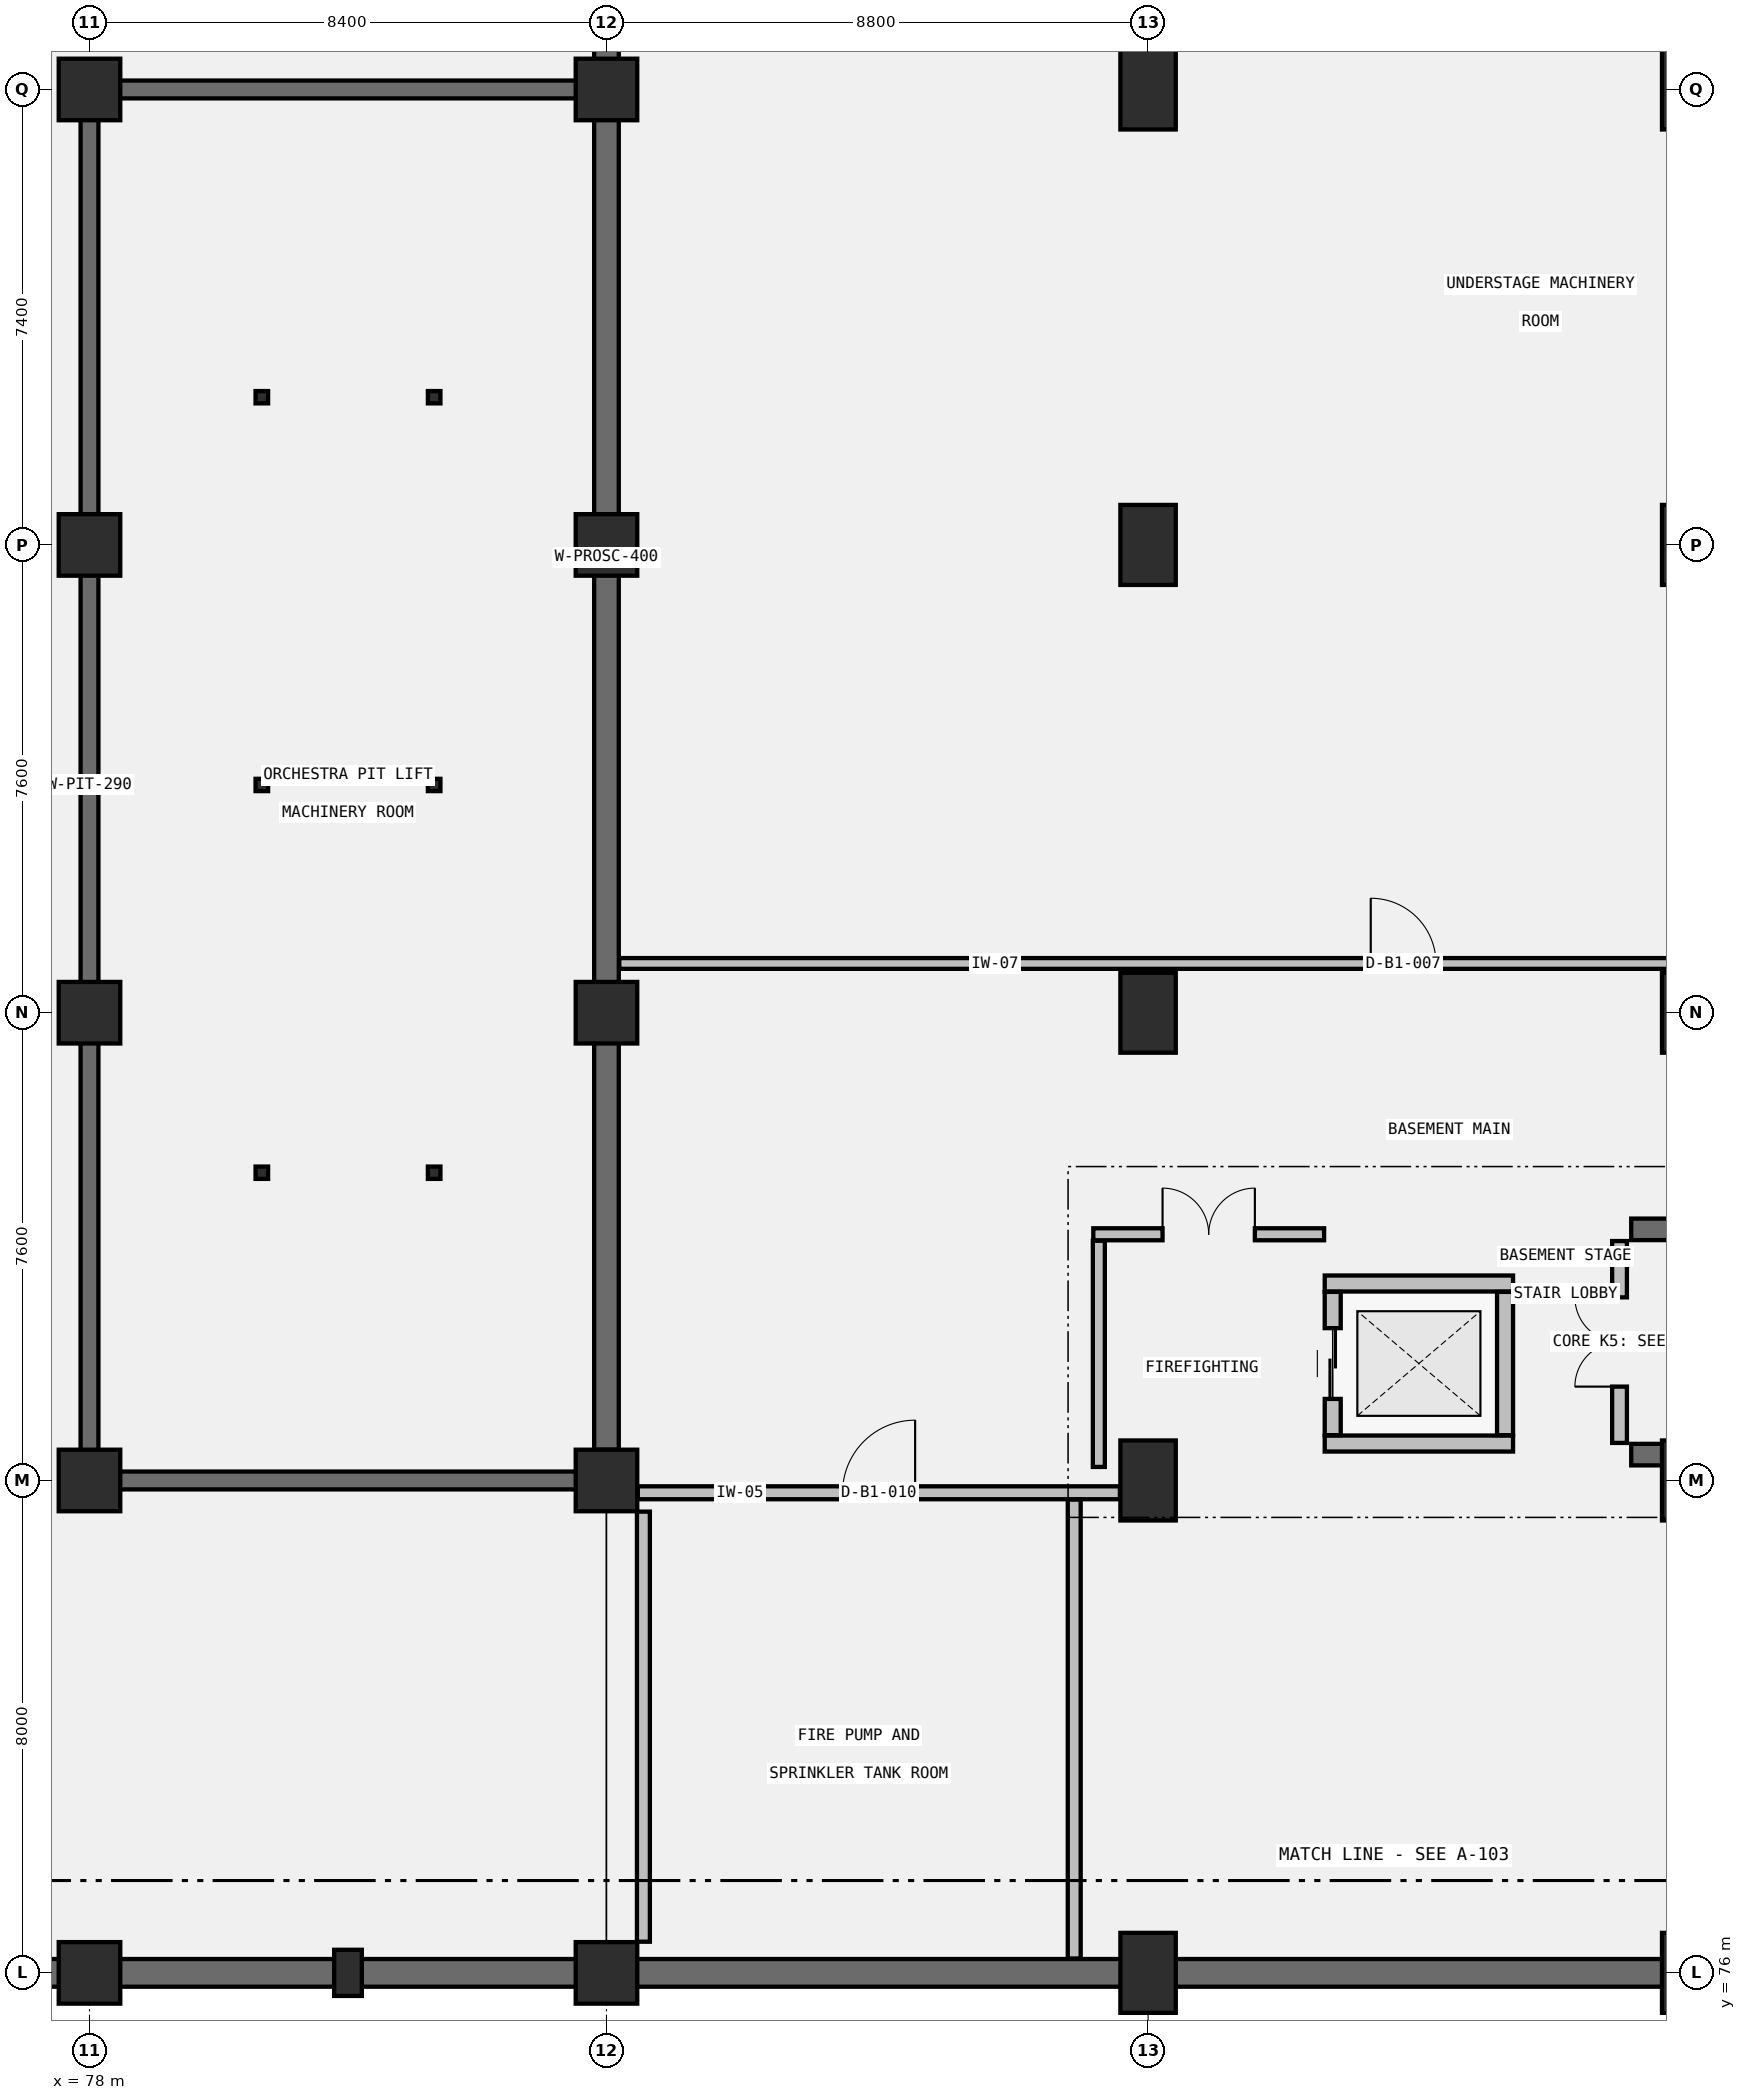
"""IFC4 building model, lengths in metres.
Left out: names, types, materials, properties, quantities, classifications, styles, units other than length and angle.
Written with IfcOpenShell. Run it as: python <this file> out.ifc"""

import sys

from ifc_helpers import new_model, si_unit, direction, frame, frame_2d, origin, origin_2d, place, context, subcontext, project, spatial, rectangle, i_section, extrude, element, fill, save


model = new_model("IFC4")
c1 = context("Model", 3, precision=1e-05, world=origin(), true_north=direction((0.0, 1.0)))
c2 = subcontext(c1, "Body", "Model", "MODEL_VIEW")
j1 = project(units=[si_unit("LENGTHUNIT", "METRE"), si_unit("PLANEANGLEUNIT", "RADIAN")], contexts=[c1])
p1 = place(None, origin())
s1 = spatial("IfcSite", under=j1, at=p1, CompositionType="ELEMENT")
p2 = place(p1, origin())
s2 = spatial("IfcBuilding", under=s1, at=p2, CompositionType="ELEMENT")
p3 = place(p2, frame((0.0, 0.0, -5.4)))
s3 = spatial("IfcBuildingStorey", under=s2, at=p3, CompositionType="ELEMENT", Elevation=-5.4)
for number, where, z_axis, x_axis in (
    (1, (78.0, 76.0, 0.0), (0.0, 0.0, 1.0), (1.0, 0.0, 0.0)),
    (2, (78.0, 84.0, 0.0), (0.0, 0.0, 1.0), (1.0, 0.0, 0.0)),
    (3, (78.0, 91.6, 0.0), (0.0, 0.0, 1.0), (1.0, 0.0, 0.0)),
    (4, (78.0, 99.2, 0.0), (0.0, 0.0, 1.0), (1.0, 0.0, 0.0)),
    (5, (78.0, 106.6, 0.0), (0.0, 0.0, 1.0), (1.0, 0.0, 0.0)),
):
    element("IfcColumn", number, at=place(p3, frame(where, z_axis=z_axis, x_axis=x_axis)), inside=s3, PredefinedType="COLUMN", context=c2, shape_type="SweptSolid", body=[
        extrude(rectangle(XDim=1.0, YDim=1.0, at=origin_2d()), origin(), (0.0, 0.0, 1.0), 5.4),
    ])
p4 = place(p3, frame((82.2, 76.0, 0.0), z_axis=(0.0, 0.0, 1.0), x_axis=(1.0, 0.0, 0.0)))
e6 = element("IfcColumn", 6, at=p4, inside=s3, PredefinedType="PILASTER", context=c2, shape_type="SweptSolid", body=[
    extrude(rectangle(XDim=0.45, YDim=0.75, at=origin_2d()), origin(), (0.0, 0.0, 1.0), 5.4),
])
for number, where, z_axis, x_axis in (
    (7, (86.4, 76.0, 0.0), (0.0, 0.0, 1.0), (1.0, 0.0, 0.0)),
    (8, (86.4, 84.0, 0.0), (0.0, 0.0, 1.0), (1.0, 0.0, 0.0)),
    (9, (86.4, 91.6, 0.0), (0.0, 0.0, 1.0), (1.0, 0.0, 0.0)),
    (10, (86.4, 99.2, 0.0), (0.0, 0.0, 1.0), (1.0, 0.0, 0.0)),
    (11, (86.4, 106.6, 0.0), (0.0, 0.0, 1.0), (1.0, 0.0, 0.0)),
):
    element("IfcColumn", number, at=place(p3, frame(where, z_axis=z_axis, x_axis=x_axis)), inside=s3, PredefinedType="COLUMN", context=c2, shape_type="SweptSolid", body=[
        extrude(rectangle(XDim=1.0, YDim=1.0, at=origin_2d()), origin(), (0.0, 0.0, 1.0), 5.4),
    ])
for number, where, z_axis, x_axis in (
    (12, (95.2, 76.0, 0.0), (0.0, 0.0, 1.0), (1.0, 0.0, 0.0)),
    (13, (95.2, 84.0, 0.0), (0.0, 0.0, 1.0), (1.0, 0.0, 0.0)),
    (14, (95.2, 91.6, 0.0), (0.0, 0.0, 1.0), (1.0, 0.0, 0.0)),
    (15, (95.2, 99.2, 0.0), (0.0, 0.0, 1.0), (1.0, 0.0, 0.0)),
    (16, (95.2, 106.6, 0.0), (0.0, 0.0, 1.0), (1.0, 0.0, 0.0)),
    (17, (104.0, 76.0, 0.0), (0.0, 0.0, 1.0), (1.0, 0.0, 0.0)),
    (18, (104.0, 84.0, 0.0), (0.0, 0.0, 1.0), (1.0, 0.0, 0.0)),
    (19, (104.0, 91.6, 0.0), (0.0, 0.0, 1.0), (1.0, 0.0, 0.0)),
    (20, (104.0, 99.2, 0.0), (0.0, 0.0, 1.0), (1.0, 0.0, 0.0)),
    (21, (104.0, 106.6, 0.0), (0.0, 0.0, 1.0), (1.0, 0.0, 0.0)),
):
    element("IfcColumn", number, at=place(p3, frame(where, z_axis=z_axis, x_axis=x_axis)), inside=s3, PredefinedType="COLUMN", context=c2, shape_type="SweptSolid", body=[
        extrude(rectangle(XDim=0.9, YDim=1.3, at=origin_2d()), origin(), (0.0, 0.0, 1.0), 5.4),
    ])
p5 = place(p3, frame((44.7, 76.0, 0.0), z_axis=(0.0, 0.0, 1.0), x_axis=(1.0, 0.0, 0.0)))
e22 = element("IfcWall", 22, at=p5, inside=s3, PredefinedType="SHEAR", context=c2, shape_type="SweptSolid", body=[
    extrude(rectangle(XDim=67.4, YDim=0.45, at=frame_2d((33.7, 0.0))), origin(), (0.0, 0.0, 1.0), 5.1),
])
p6 = place(p3, frame((78.0, 84.3, 0.0), z_axis=(0.0, 0.0, 1.0), x_axis=(0.0, 1.0, 0.0)))
e23 = element("IfcWall", 23, at=p6, inside=s3, PredefinedType="SHEAR", context=c2, shape_type="SweptSolid", body=[
    extrude(rectangle(XDim=22.0, YDim=0.29, at=frame_2d((11.0, 0.0))), origin(), (0.0, 0.0, 1.0), 5.1),
])
for number, where, z_axis, x_axis in (
    (24, (78.3, 84.0, 0.0), (0.0, 0.0, 1.0), (1.0, 0.0, 0.0)),
    (25, (78.3, 106.6, 0.0), (0.0, 0.0, 1.0), (1.0, 0.0, 0.0)),
):
    element("IfcWall", number, at=place(p3, frame(where, z_axis=z_axis, x_axis=x_axis)), inside=s3, PredefinedType="SHEAR", context=c2, shape_type="SweptSolid", body=[
        extrude(rectangle(XDim=7.8, YDim=0.29, at=frame_2d((3.9, 0.0))), origin(), (0.0, 0.0, 1.0), 5.1),
    ])
p7 = place(p3, frame((86.4, 84.5, 0.0), z_axis=(0.0, 0.0, 1.0), x_axis=(0.0, 1.0, 0.0)))
e26 = element("IfcWall", 26, at=p7, inside=s3, PredefinedType="SHEAR", context=c2, shape_type="SweptSolid", body=[
    extrude(rectangle(XDim=29.0, YDim=0.4, at=frame_2d((14.5, 0.0))), origin(), (0.0, 0.0, 1.0), 5.1),
])
for number, where, z_axis, x_axis in (
    (27, (103.05, 84.42, 0.0), (0.0, 0.0, 1.0), (1.0, 0.0, 0.0)),
    (28, (111.2, 88.08, 0.0), (0.0, 0.0, 1.0), (-1.0, 0.0, 0.0)),
):
    element("IfcWall", number, at=place(p3, frame(where, z_axis=z_axis, x_axis=x_axis)), inside=s3, PredefinedType="SHEAR", context=c2, shape_type="SweptSolid", body=[
        extrude(rectangle(XDim=8.15, YDim=0.35, at=frame_2d((4.075, 0.0))), origin(), (0.0, 0.0, 1.0), 5.1),
    ])
for number, where, z_axis, x_axis in (
    (29, (80.8, 89.0, 0.0), (0.0, 0.0, 1.0), (1.0, 0.0, 0.0)),
    (30, (80.8, 95.3, 0.0), (0.0, 0.0, 1.0), (1.0, 0.0, 0.0)),
    (31, (80.8, 101.6, 0.0), (0.0, 0.0, 1.0), (1.0, 0.0, 0.0)),
    (32, (83.6, 89.0, 0.0), (0.0, 0.0, 1.0), (1.0, 0.0, 0.0)),
    (33, (83.6, 95.3, 0.0), (0.0, 0.0, 1.0), (1.0, 0.0, 0.0)),
    (34, (83.6, 101.6, 0.0), (0.0, 0.0, 1.0), (1.0, 0.0, 0.0)),
):
    element("IfcColumn", number, at=place(p3, frame(where, z_axis=z_axis, x_axis=x_axis)), inside=s3, PredefinedType="COLUMN", context=c2, shape_type="SweptSolid", body=[
        extrude(i_section(OverallWidth=0.204, OverallDepth=0.2, WebThickness=0.012, FlangeThickness=0.012, FilletRadius=0.013, at=origin_2d()), origin(), (0.0, 0.0, 1.0), 3.0),
    ])
p8 = place(p3, frame((102.86, 84.61, 0.0), z_axis=(0.0, 0.0, 1.0), x_axis=(0.0, 1.0, 0.0)))
e35 = element("IfcWall", 35, at=p8, inside=s3, PredefinedType="STANDARD", context=c2, shape_type="SweptSolid", body=[
    extrude(rectangle(XDim=3.28, YDim=0.24, at=frame_2d((1.64, 0.0))), origin(), (0.0, 0.0, 1.0), 5.1),
])
p9 = place(p8, frame((0.915, 0.0, 0.0)))
e36 = element("IfcOpeningElement", 36, at=p9, cuts=e35, PredefinedType="OPENING", context=c2, shape_type="SweptSolid", body=[
    extrude(rectangle(XDim=1.45, YDim=2.2, at=frame_2d((0.725, 1.1))), frame((0.0, 0.13, 0.0), z_axis=(0.0, -1.0, 0.0), x_axis=(1.0, 0.0, 0.0)), (0.0, 0.0, 1.0), 0.26),
])
for number, where, z_axis, x_axis in (
    (37, (98.07, 84.6, 0.0), (0.0, 0.0, 1.0), (1.0, 0.0, 0.0)),
    (38, (98.07, 87.2, 0.0), (0.0, 0.0, 1.0), (1.0, 0.0, 0.0)),
):
    element("IfcWall", number, at=place(p3, frame(where, z_axis=z_axis, x_axis=x_axis)), inside=s3, PredefinedType="STANDARD", context=c2, shape_type="SweptSolid", body=[
        extrude(rectangle(XDim=3.06, YDim=0.26, at=frame_2d((1.53, 0.0))), origin(), (0.0, 0.0, 1.0), 5.1),
    ])
p10 = place(p3, frame((98.2, 84.736, 0.0), z_axis=(0.0, 0.0, 1.0), x_axis=(0.0, 1.0, 0.0)))
e39 = element("IfcWall", 39, at=p10, inside=s3, PredefinedType="STANDARD", context=c2, shape_type="SweptSolid", body=[
    extrude(rectangle(XDim=2.328, YDim=0.26, at=frame_2d((1.164, 0.0))), origin(), (0.0, 0.0, 1.0), 5.1),
])
p11 = place(p10, frame((0.589, 0.0, 0.0)))
e40 = element("IfcOpeningElement", 40, at=p11, cuts=e39, PredefinedType="OPENING", context=c2, shape_type="SweptSolid", body=[
    extrude(rectangle(XDim=1.15, YDim=2.15, at=frame_2d((0.575, 1.075))), frame((0.0, 0.14, 0.0), z_axis=(0.0, -1.0, 0.0), x_axis=(1.0, 0.0, 0.0)), (0.0, 0.0, 1.0), 0.28),
])
p12 = place(p3, frame((101.0, 84.736, 0.0), z_axis=(0.0, 0.0, 1.0), x_axis=(0.0, 1.0, 0.0)))
e41 = element("IfcWall", 41, at=p12, inside=s3, PredefinedType="STANDARD", context=c2, shape_type="SweptSolid", body=[
    extrude(rectangle(XDim=2.328, YDim=0.26, at=frame_2d((1.164, 0.0))), origin(), (0.0, 0.0, 1.0), 5.1),
])
p13 = place(p3, frame((94.4, 84.22, 0.0), z_axis=(0.0, 0.0, 1.0), x_axis=(0.0, 1.0, 0.0)))
e42 = element("IfcWall", 42, at=p13, inside=s3, PredefinedType="PARTITIONING", context=c2, shape_type="SweptSolid", body=[
    extrude(rectangle(XDim=3.675, YDim=0.195, at=frame_2d((1.837, 0.0))), origin(), (0.0, 0.0, 1.0), 4.278),
])
p14 = place(p3, frame((94.31, 88.0, 0.0), z_axis=(0.0, 0.0, 1.0), x_axis=(1.0, 0.0, 0.0)))
e43 = element("IfcWall", 43, at=p14, inside=s3, PredefinedType="PARTITIONING", context=c2, shape_type="SweptSolid", body=[
    extrude(rectangle(XDim=3.75, YDim=0.195, at=frame_2d((1.875, 0.0))), origin(), (0.0, 0.0, 1.0), 4.516),
])
p15 = place(p14, frame((1.125, 0.0, 0.0)))
e44 = element("IfcOpeningElement", 44, at=p15, cuts=e43, PredefinedType="OPENING", context=c2, shape_type="SweptSolid", body=[
    extrude(rectangle(XDim=1.5, YDim=2.2, at=frame_2d((0.75, 1.1))), frame((0.0, 0.107, 0.0), z_axis=(0.0, -1.0, 0.0), x_axis=(1.0, 0.0, 0.0)), (0.0, 0.0, 1.0), 0.215),
])
p16 = place(p3, frame((86.608, 92.4, 0.0), z_axis=(0.0, 0.0, 1.0), x_axis=(1.0, 0.0, 0.0)))
e45 = element("IfcWall", 45, at=p16, inside=s3, PredefinedType="PARTITIONING", context=c2, shape_type="SweptSolid", body=[
    extrude(rectangle(XDim=25.479, YDim=0.175, at=frame_2d((12.74, 0.0))), origin(), (0.0, 0.0, 1.0), 4.516),
])
p17 = place(p16, frame((12.21, 0.0, 0.0)))
e46 = element("IfcOpeningElement", 46, at=p17, cuts=e45, PredefinedType="OPENING", context=c2, shape_type="SweptSolid", body=[
    extrude(rectangle(XDim=1.06, YDim=2.15, at=frame_2d((0.53, 1.075))), frame((0.0, 0.097, 0.0), z_axis=(0.0, -1.0, 0.0), x_axis=(1.0, 0.0, 0.0)), (0.0, 0.0, 1.0), 0.195),
])
p18 = place(p3, frame((86.908, 83.8, 0.0), z_axis=(0.0, 0.0, 1.0), x_axis=(1.0, 0.0, 0.0)))
e47 = element("IfcWall", 47, at=p18, inside=s3, PredefinedType="PARTITIONING", context=c2, shape_type="SweptSolid", body=[
    extrude(rectangle(XDim=7.834, YDim=0.21, at=frame_2d((3.917, 0.0))), origin(), (0.0, 0.0, 1.0), 4.278),
])
p19 = place(p18, frame((3.327, 0.0, 0.0)))
e48 = element("IfcOpeningElement", 48, at=p19, cuts=e47, PredefinedType="OPENING", context=c2, shape_type="SweptSolid", body=[
    extrude(rectangle(XDim=1.18, YDim=2.22, at=frame_2d((0.59, 1.11))), frame((0.0, 0.115, 0.0), z_axis=(0.0, -1.0, 0.0), x_axis=(1.0, 0.0, 0.0)), (0.0, 0.0, 1.0), 0.23),
])
p20 = place(p3, frame((94.0, 76.233, 0.0), z_axis=(0.0, 0.0, 1.0), x_axis=(0.0, 1.0, 0.0)))
e49 = element("IfcWall", 49, at=p20, inside=s3, PredefinedType="PARTITIONING", context=c2, shape_type="SweptSolid", body=[
    extrude(rectangle(XDim=7.456, YDim=0.21, at=frame_2d((3.728, 0.0))), origin(), (0.0, 0.0, 1.0), 5.1),
])
p21 = place(p3, frame((87.0, 76.506, 0.0), z_axis=(0.0, 0.0, 1.0), x_axis=(0.0, 1.0, 0.0)))
e50 = element("IfcWall", 50, at=p21, inside=s3, PredefinedType="PARTITIONING", context=c2, shape_type="SweptSolid", body=[
    extrude(rectangle(XDim=6.988, YDim=0.21, at=frame_2d((3.494, 0.0))), origin(), (0.0, 0.0, 1.0), 5.1),
])
p22 = place(p9, origin())
e51 = element("IfcDoor", 51, at=p22, inside=s3, OperationType="DOUBLE_DOOR_SINGLE_SWING", PredefinedType="DOOR", context=c2, shape_type="SweptSolid", body=[
    extrude(rectangle(XDim=1.45, YDim=2.2, at=frame_2d((0.725, 1.1))), frame((0.0, 0.025, 0.0), z_axis=(0.0, -1.0, 0.0), x_axis=(1.0, 0.0, 0.0)), (0.0, 0.0, 1.0), 0.05),
])
fill(e36, e51)
p23 = place(p11, origin())
e52 = element("IfcDoor", 52, at=p23, inside=s3, OperationType="SLIDING_TO_LEFT", PredefinedType="DOOR", context=c2, shape_type="SweptSolid", body=[
    extrude(rectangle(XDim=1.15, YDim=2.15, at=frame_2d((0.575, 1.075))), frame((0.0, 0.025, 0.0), z_axis=(0.0, -1.0, 0.0), x_axis=(1.0, 0.0, 0.0)), (0.0, 0.0, 1.0), 0.05),
])
fill(e40, e52)
p24 = place(p15, origin())
e53 = element("IfcDoor", 53, at=p24, inside=s3, OperationType="DOUBLE_DOOR_SINGLE_SWING", PredefinedType="DOOR", context=c2, shape_type="SweptSolid", body=[
    extrude(rectangle(XDim=1.5, YDim=2.2, at=frame_2d((0.75, 1.1))), frame((0.0, 0.025, 0.0), z_axis=(0.0, -1.0, 0.0), x_axis=(1.0, 0.0, 0.0)), (0.0, 0.0, 1.0), 0.05),
])
fill(e44, e53)
p25 = place(p17, origin())
e54 = element("IfcDoor", 54, at=p25, inside=s3, OperationType="SINGLE_SWING_LEFT", PredefinedType="DOOR", context=c2, shape_type="SweptSolid", body=[
    extrude(rectangle(XDim=1.06, YDim=2.15, at=frame_2d((0.53, 1.075))), frame((0.0, 0.025, 0.0), z_axis=(0.0, -1.0, 0.0), x_axis=(1.0, 0.0, 0.0)), (0.0, 0.0, 1.0), 0.05),
])
fill(e46, e54)
p26 = place(p19, origin())
e55 = element("IfcDoor", 55, at=p26, inside=s3, OperationType="SINGLE_SWING_RIGHT", PredefinedType="DOOR", context=c2, shape_type="SweptSolid", body=[
    extrude(rectangle(XDim=1.18, YDim=2.22, at=frame_2d((0.59, 1.11))), frame((0.0, 0.025, 0.0), z_axis=(0.0, -1.0, 0.0), x_axis=(1.0, 0.0, 0.0)), (0.0, 0.0, 1.0), 0.05),
])
fill(e48, e55)
save(model, sys.argv[1])
